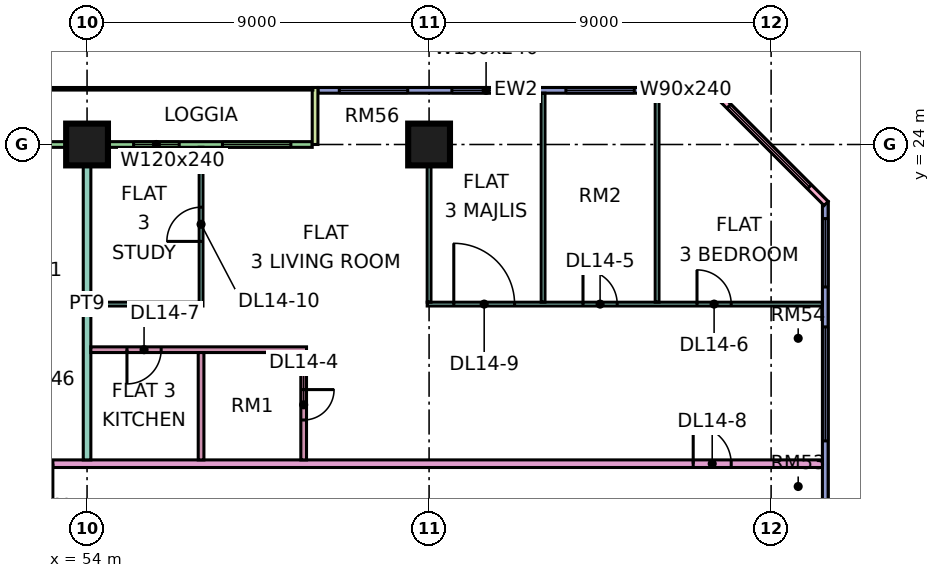
"""IFC4 building model, lengths in metres.
Left out: names, types, materials, properties, quantities, classifications, styles, units other than length and angle.
Written with IfcOpenShell. Run it as: python <this file> out.ifc"""

import sys

from ifc_helpers import new_model, si_unit, direction, frame, frame_2d, origin, origin_2d, place, context, subcontext, project, spatial, rectangle, extrude, element, fill, save


model = new_model("IFC4")
c1 = context("Model", 3, precision=1e-05, world=origin(), true_north=direction((0.0, 1.0)))
c2 = subcontext(c1, "Body", "Model", "MODEL_VIEW")
j1 = project(units=[si_unit("LENGTHUNIT", "METRE"), si_unit("PLANEANGLEUNIT", "RADIAN")], contexts=[c1])
p1 = place(None, origin())
s1 = spatial("IfcSite", under=j1, at=p1, CompositionType="ELEMENT")
p2 = place(p1, origin())
s2 = spatial("IfcBuilding", under=s1, at=p2, CompositionType="ELEMENT")
p3 = place(p2, frame((0.0, 0.0, 67.65)))
s3 = spatial("IfcBuildingStorey", under=s2, at=p3, CompositionType="ELEMENT", Elevation=67.65)
for number, where, z_axis, x_axis in (
    (1, (54.0, 24.0, 0.0), (0.0, 0.0, 1.0), (1.0, 0.0, 0.0)),
    (2, (63.0, 24.0, 0.0), (0.0, 0.0, 1.0), (1.0, 0.0, 0.0)),
):
    element("IfcColumn", number, at=place(p3, frame(where, z_axis=z_axis, x_axis=x_axis)), inside=s3, PredefinedType="COLUMN", context=c2, shape_type="SweptSolid", body=[
        extrude(rectangle(XDim=1.1, YDim=1.1, at=origin_2d()), origin(), (0.0, 0.0, 1.0), 3.75),
    ])
p4 = place(p3, frame((70.5, 25.425, 0.0), z_axis=(0.0, 0.0, 1.0), x_axis=(-1.0, 0.0, 0.0)))
e3 = element("IfcWall", 3, at=p4, inside=s3, PredefinedType="SOLIDWALL", context=c2, shape_type="SweptSolid", body=[
    extrude(rectangle(XDim=10.425, YDim=0.15, at=frame_2d((5.212, 0.0))), origin(), (0.0, 0.0, 1.0), 3.35),
])
p5 = place(p4, frame((0.3, 0.0, 0.45)))
e4 = element("IfcOpeningElement", 4, at=p5, cuts=e3, PredefinedType="OPENING", context=c2, shape_type="SweptSolid", body=[
    extrude(rectangle(XDim=0.9, YDim=2.4, at=frame_2d((0.45, 1.2))), frame((0.0, 0.085, 0.0), z_axis=(0.0, -1.0, 0.0), x_axis=(1.0, 0.0, 0.0)), (0.0, 0.0, 1.0), 0.17),
])
p6 = place(p4, frame((2.1, 0.0, 0.45)))
e5 = element("IfcOpeningElement", 5, at=p6, cuts=e3, PredefinedType="OPENING", context=c2, shape_type="SweptSolid", body=[
    extrude(rectangle(XDim=1.8, YDim=2.4, at=frame_2d((0.9, 1.2))), frame((0.0, 0.085, 0.0), z_axis=(0.0, -1.0, 0.0), x_axis=(1.0, 0.0, 0.0)), (0.0, 0.0, 1.0), 0.17),
])
p7 = place(p4, frame((5.1, 0.0, 0.45)))
e6 = element("IfcOpeningElement", 6, at=p7, cuts=e3, PredefinedType="OPENING", context=c2, shape_type="SweptSolid", body=[
    extrude(rectangle(XDim=1.8, YDim=2.4, at=frame_2d((0.9, 1.2))), frame((0.0, 0.085, 0.0), z_axis=(0.0, -1.0, 0.0), x_axis=(1.0, 0.0, 0.0)), (0.0, 0.0, 1.0), 0.17),
])
p8 = place(p4, frame((8.062, 0.0, 0.45)))
e7 = element("IfcOpeningElement", 7, at=p8, cuts=e3, PredefinedType="OPENING", context=c2, shape_type="SweptSolid", body=[
    extrude(rectangle(XDim=1.8, YDim=2.4, at=frame_2d((0.9, 1.2))), frame((0.0, 0.085, 0.0), z_axis=(0.0, -1.0, 0.0), x_axis=(1.0, 0.0, 0.0)), (0.0, 0.0, 1.0), 0.17),
])
p9 = place(p3, frame((59.925, 24.0, 0.0), z_axis=(0.0, 0.0, 1.0), x_axis=(-1.0, 0.0, 0.0)))
e8 = element("IfcWall", 8, at=p9, inside=s3, PredefinedType="SOLIDWALL", context=c2, shape_type="SweptSolid", body=[
    extrude(rectangle(XDim=11.85, YDim=0.15, at=frame_2d((5.925, 0.0))), origin(), (0.0, 0.0, 1.0), 3.35),
])
p10 = place(p9, frame((0.562, 0.0, 0.45)))
e9 = element("IfcOpeningElement", 9, at=p10, cuts=e8, PredefinedType="OPENING", context=c2, shape_type="SweptSolid", body=[
    extrude(rectangle(XDim=1.8, YDim=2.4, at=frame_2d((0.9, 1.2))), frame((0.0, 0.085, 0.0), z_axis=(0.0, -1.0, 0.0), x_axis=(1.0, 0.0, 0.0)), (0.0, 0.0, 1.0), 0.17),
])
p11 = place(p9, frame((3.5, 0.0, 0.45)))
e10 = element("IfcOpeningElement", 10, at=p11, cuts=e8, PredefinedType="OPENING", context=c2, shape_type="SweptSolid", body=[
    extrude(rectangle(XDim=1.2, YDim=2.4, at=frame_2d((0.6, 1.2))), frame((0.0, 0.085, 0.0), z_axis=(0.0, -1.0, 0.0), x_axis=(1.0, 0.0, 0.0)), (0.0, 0.0, 1.0), 0.17),
])
p12 = place(p9, frame((7.113, 0.0, 0.45)))
e11 = element("IfcOpeningElement", 11, at=p12, cuts=e8, PredefinedType="OPENING", context=c2, shape_type="SweptSolid", body=[
    extrude(rectangle(XDim=4.2, YDim=2.4, at=frame_2d((2.1, 1.2))), frame((0.0, 0.085, 0.0), z_axis=(0.0, -1.0, 0.0), x_axis=(1.0, 0.0, 0.0)), (0.0, 0.0, 1.0), 0.17),
])
p13 = place(p3, frame((60.0, 25.5, 0.0), z_axis=(0.0, 0.0, 1.0), x_axis=(0.0, -1.0, 0.0)))
e12 = element("IfcWall", 12, at=p13, inside=s3, PredefinedType="SOLIDWALL", context=c2, shape_type="SweptSolid", body=[
    extrude(rectangle(XDim=1.5, YDim=0.15, at=frame_2d((0.75, 0.0))), origin(), (0.0, 0.0, 1.0), 3.35),
])
p14 = place(p3, frame((73.425, 12.075, 0.0), z_axis=(0.0, 0.0, 1.0), x_axis=(0.0, 1.0, 0.0)))
e13 = element("IfcWall", 13, at=p14, inside=s3, PredefinedType="SOLIDWALL", context=c2, shape_type="SweptSolid", body=[
    extrude(rectangle(XDim=10.425, YDim=0.15, at=frame_2d((5.212, 0.0))), origin(), (0.0, 0.0, 1.0), 3.35),
])
p15 = place(p14, frame((4.125, 0.0, 0.45)))
e14 = element("IfcOpeningElement", 14, at=p15, cuts=e13, PredefinedType="OPENING", context=c2, shape_type="SweptSolid", body=[
    extrude(rectangle(XDim=3.0, YDim=2.4, at=frame_2d((1.5, 1.2))), frame((0.0, 0.085, 0.0), z_axis=(0.0, -1.0, 0.0), x_axis=(1.0, 0.0, 0.0)), (0.0, 0.0, 1.0), 0.17),
])
p16 = place(p14, frame((8.175, 0.0, 0.45)))
e15 = element("IfcOpeningElement", 15, at=p16, cuts=e13, PredefinedType="OPENING", context=c2, shape_type="SweptSolid", body=[
    extrude(rectangle(XDim=1.8, YDim=2.4, at=frame_2d((0.9, 1.2))), frame((0.0, 0.085, 0.0), z_axis=(0.0, -1.0, 0.0), x_axis=(1.0, 0.0, 0.0)), (0.0, 0.0, 1.0), 0.17),
])
p17 = place(p3, frame((73.447, 22.447, 0.0), z_axis=(0.0, 0.0, 1.0), x_axis=(-0.707106781187, 0.707106781187, 0.0)))
e16 = element("IfcWall", 16, at=p17, inside=s3, PredefinedType="SOLIDWALL", context=c2, shape_type="SweptSolid", body=[
    extrude(rectangle(XDim=4.243, YDim=0.15, at=frame_2d((2.121, 0.0))), origin(), (0.0, 0.0, 1.0), 3.35),
])
p18 = place(p17, frame((0.621, 0.0, 0.45)))
e17 = element("IfcOpeningElement", 17, at=p18, cuts=e16, PredefinedType="OPENING", context=c2, shape_type="SweptSolid", body=[
    extrude(rectangle(XDim=3.0, YDim=2.4, at=frame_2d((1.5, 1.2))), frame((0.0, 0.085, 0.0), z_axis=(0.0, -1.0, 0.0), x_axis=(1.0, 0.0, 0.0)), (0.0, 0.0, 1.0), 0.17),
])
p19 = place(p3, frame((51.225, 15.6, 0.0), z_axis=(0.0, 0.0, 1.0), x_axis=(1.0, 0.0, 0.0)))
e18 = element("IfcWall", 18, at=p19, inside=s3, PredefinedType="PARTITIONING", context=c2, shape_type="SweptSolid", body=[
    extrude(rectangle(XDim=22.125, YDim=0.2, at=frame_2d((11.062, 0.0))), origin(), (0.0, 0.0, 1.0), 3.35),
])
p20 = place(p19, frame((18.725, 0.0, 0.0)))
e19 = element("IfcOpeningElement", 19, at=p20, cuts=e18, PredefinedType="OPENING", context=c2, shape_type="SweptSolid", body=[
    extrude(rectangle(XDim=1.0, YDim=2.1, at=frame_2d((0.5, 1.05))), frame((0.0, 0.11, 0.0), z_axis=(0.0, -1.0, 0.0), x_axis=(1.0, 0.0, 0.0)), (0.0, 0.0, 1.0), 0.22),
])
p21 = place(p19, frame((0.875, 0.0, 0.0)))
e20 = element("IfcOpeningElement", 20, at=p21, cuts=e18, PredefinedType="OPENING", context=c2, shape_type="SweptSolid", body=[
    extrude(rectangle(XDim=1.0, YDim=2.1, at=frame_2d((0.5, 1.05))), frame((0.0, 0.11, 0.0), z_axis=(0.0, -1.0, 0.0), x_axis=(1.0, 0.0, 0.0)), (0.0, 0.0, 1.0), 0.22),
])
p22 = place(p3, frame((54.0, 15.7, 0.0), z_axis=(0.0, 0.0, 1.0), x_axis=(0.0, 1.0, 0.0)))
e21 = element("IfcWall", 21, at=p22, inside=s3, PredefinedType="PARTITIONING", context=c2, shape_type="SweptSolid", body=[
    extrude(rectangle(XDim=8.226, YDim=0.2, at=frame_2d((4.113, 0.0))), origin(), (0.0, 0.0, 1.0), 3.35),
])
p23 = place(p3, frame((54.1, 18.6, 0.0), z_axis=(0.0, 0.0, 1.0), x_axis=(1.0, 0.0, 0.0)))
e22 = element("IfcWall", 22, at=p23, inside=s3, PredefinedType="PARTITIONING", context=c2, shape_type="SweptSolid", body=[
    extrude(rectangle(XDim=5.675, YDim=0.15, at=frame_2d((2.837, 0.0))), origin(), (0.0, 0.0, 1.0), 3.35),
])
p24 = place(p23, frame((0.95, 0.0, 0.0)))
e23 = element("IfcOpeningElement", 23, at=p24, cuts=e22, PredefinedType="OPENING", context=c2, shape_type="SweptSolid", body=[
    extrude(rectangle(XDim=0.9, YDim=2.1, at=frame_2d((0.45, 1.05))), frame((0.0, 0.085, 0.0), z_axis=(0.0, -1.0, 0.0), x_axis=(1.0, 0.0, 0.0)), (0.0, 0.0, 1.0), 0.17),
])
p25 = place(p3, frame((54.1, 19.8, 0.0), z_axis=(0.0, 0.0, 1.0), x_axis=(1.0, 0.0, 0.0)))
e24 = element("IfcWall", 24, at=p25, inside=s3, PredefinedType="PARTITIONING", context=c2, shape_type="SweptSolid", body=[
    extrude(rectangle(XDim=2.85, YDim=0.1, at=frame_2d((1.425, 0.0))), origin(), (0.0, 0.0, 1.0), 3.35),
])
p26 = place(p3, frame((57.0, 15.7, 0.0), z_axis=(0.0, 0.0, 1.0), x_axis=(0.0, 1.0, 0.0)))
e25 = element("IfcWall", 25, at=p26, inside=s3, PredefinedType="PARTITIONING", context=c2, shape_type="SweptSolid", body=[
    extrude(rectangle(XDim=2.825, YDim=0.15, at=frame_2d((1.413, 0.0))), origin(), (0.0, 0.0, 1.0), 3.35),
])
p27 = place(p3, frame((57.0, 19.75, 0.0), z_axis=(0.0, 0.0, 1.0), x_axis=(0.0, 1.0, 0.0)))
e26 = element("IfcWall", 26, at=p27, inside=s3, PredefinedType="PARTITIONING", context=c2, shape_type="SweptSolid", body=[
    extrude(rectangle(XDim=4.176, YDim=0.1, at=frame_2d((2.088, 0.0))), origin(), (0.0, 0.0, 1.0), 3.35),
])
p28 = place(p27, frame((1.7, 0.0, 0.0)))
e27 = element("IfcOpeningElement", 27, at=p28, cuts=e26, PredefinedType="OPENING", context=c2, shape_type="SweptSolid", body=[
    extrude(rectangle(XDim=0.9, YDim=2.1, at=frame_2d((0.45, 1.05))), frame((0.0, 0.06, 0.0), z_axis=(0.0, -1.0, 0.0), x_axis=(1.0, 0.0, 0.0)), (0.0, 0.0, 1.0), 0.12),
])
p29 = place(p3, frame((59.7, 15.7, 0.0), z_axis=(0.0, 0.0, 1.0), x_axis=(0.0, 1.0, 0.0)))
e28 = element("IfcWall", 28, at=p29, inside=s3, PredefinedType="PARTITIONING", context=c2, shape_type="SweptSolid", body=[
    extrude(rectangle(XDim=2.825, YDim=0.15, at=frame_2d((1.413, 0.0))), origin(), (0.0, 0.0, 1.0), 3.35),
])
p30 = place(p29, frame((1.05, 0.0, 0.0)))
e29 = element("IfcOpeningElement", 29, at=p30, cuts=e28, PredefinedType="OPENING", context=c2, shape_type="SweptSolid", body=[
    extrude(rectangle(XDim=0.8, YDim=2.1, at=frame_2d((0.4, 1.05))), frame((0.0, 0.085, 0.0), z_axis=(0.0, -1.0, 0.0), x_axis=(1.0, 0.0, 0.0)), (0.0, 0.0, 1.0), 0.17),
])
p31 = place(p3, frame((62.95, 19.8, 0.0), z_axis=(0.0, 0.0, 1.0), x_axis=(1.0, 0.0, 0.0)))
e30 = element("IfcWall", 30, at=p31, inside=s3, PredefinedType="PARTITIONING", context=c2, shape_type="SweptSolid", body=[
    extrude(rectangle(XDim=10.4, YDim=0.1, at=frame_2d((5.2, 0.0))), origin(), (0.0, 0.0, 1.0), 3.35),
])
p32 = place(p31, frame((4.1, 0.0, 0.0)))
e31 = element("IfcOpeningElement", 31, at=p32, cuts=e30, PredefinedType="OPENING", context=c2, shape_type="SweptSolid", body=[
    extrude(rectangle(XDim=0.9, YDim=2.1, at=frame_2d((0.45, 1.05))), frame((0.0, 0.06, 0.0), z_axis=(0.0, -1.0, 0.0), x_axis=(1.0, 0.0, 0.0)), (0.0, 0.0, 1.0), 0.12),
])
p33 = place(p31, frame((7.1, 0.0, 0.0)))
e32 = element("IfcOpeningElement", 32, at=p33, cuts=e30, PredefinedType="OPENING", context=c2, shape_type="SweptSolid", body=[
    extrude(rectangle(XDim=0.9, YDim=2.1, at=frame_2d((0.45, 1.05))), frame((0.0, 0.06, 0.0), z_axis=(0.0, -1.0, 0.0), x_axis=(1.0, 0.0, 0.0)), (0.0, 0.0, 1.0), 0.12),
])
p34 = place(p31, frame((0.7, 0.0, 0.0)))
e33 = element("IfcOpeningElement", 33, at=p34, cuts=e30, PredefinedType="OPENING", context=c2, shape_type="SweptSolid", body=[
    extrude(rectangle(XDim=1.6, YDim=2.1, at=frame_2d((0.8, 1.05))), frame((0.0, 0.06, 0.0), z_axis=(0.0, -1.0, 0.0), x_axis=(1.0, 0.0, 0.0)), (0.0, 0.0, 1.0), 0.12),
])
p35 = place(p3, frame((63.0, 19.85, 0.0), z_axis=(0.0, 0.0, 1.0), x_axis=(0.0, 1.0, 0.0)))
e34 = element("IfcWall", 34, at=p35, inside=s3, PredefinedType="PARTITIONING", context=c2, shape_type="SweptSolid", body=[
    extrude(rectangle(XDim=4.15, YDim=0.1, at=frame_2d((2.075, 0.0))), origin(), (0.0, 0.0, 1.0), 3.35),
])
for number, where, z_axis, x_axis in (
    (35, (66.0, 19.85, 0.0), (0.0, 0.0, 1.0), (0.0, 1.0, 0.0)),
    (36, (69.0, 19.85, 0.0), (0.0, 0.0, 1.0), (0.0, 1.0, 0.0)),
):
    element("IfcWall", number, at=place(p3, frame(where, z_axis=z_axis, x_axis=x_axis)), inside=s3, PredefinedType="PARTITIONING", context=c2, shape_type="SweptSolid", body=[
        extrude(rectangle(XDim=5.501, YDim=0.1, at=frame_2d((2.75, 0.0))), origin(), (0.0, 0.0, 1.0), 3.35),
    ])
p36 = place(p5, origin())
e37 = element("IfcWindow", 37, at=p36, inside=s3, PartitioningType="SINGLE_PANEL", PredefinedType="WINDOW", context=c2, shape_type="SweptSolid", body=[
    extrude(rectangle(XDim=0.9, YDim=2.4, at=frame_2d((0.45, 1.2))), frame((0.0, 0.03, 0.0), z_axis=(0.0, -1.0, 0.0), x_axis=(1.0, 0.0, 0.0)), (0.0, 0.0, 1.0), 0.06),
])
fill(e4, e37)
p37 = place(p6, origin())
e38 = element("IfcWindow", 38, at=p37, inside=s3, PartitioningType="SINGLE_PANEL", PredefinedType="WINDOW", context=c2, shape_type="SweptSolid", body=[
    extrude(rectangle(XDim=1.8, YDim=2.4, at=frame_2d((0.9, 1.2))), frame((0.0, 0.03, 0.0), z_axis=(0.0, -1.0, 0.0), x_axis=(1.0, 0.0, 0.0)), (0.0, 0.0, 1.0), 0.06),
])
fill(e5, e38)
p38 = place(p7, origin())
e39 = element("IfcWindow", 39, at=p38, inside=s3, PartitioningType="SINGLE_PANEL", PredefinedType="WINDOW", context=c2, shape_type="SweptSolid", body=[
    extrude(rectangle(XDim=1.8, YDim=2.4, at=frame_2d((0.9, 1.2))), frame((0.0, 0.03, 0.0), z_axis=(0.0, -1.0, 0.0), x_axis=(1.0, 0.0, 0.0)), (0.0, 0.0, 1.0), 0.06),
])
fill(e6, e39)
p39 = place(p8, origin())
e40 = element("IfcWindow", 40, at=p39, inside=s3, PartitioningType="SINGLE_PANEL", PredefinedType="WINDOW", context=c2, shape_type="SweptSolid", body=[
    extrude(rectangle(XDim=1.8, YDim=2.4, at=frame_2d((0.9, 1.2))), frame((0.0, 0.03, 0.0), z_axis=(0.0, -1.0, 0.0), x_axis=(1.0, 0.0, 0.0)), (0.0, 0.0, 1.0), 0.06),
])
fill(e7, e40)
p40 = place(p10, origin())
e41 = element("IfcWindow", 41, at=p40, inside=s3, PartitioningType="SINGLE_PANEL", PredefinedType="WINDOW", context=c2, shape_type="SweptSolid", body=[
    extrude(rectangle(XDim=1.8, YDim=2.4, at=frame_2d((0.9, 1.2))), frame((0.0, 0.03, 0.0), z_axis=(0.0, -1.0, 0.0), x_axis=(1.0, 0.0, 0.0)), (0.0, 0.0, 1.0), 0.06),
])
fill(e9, e41)
p41 = place(p11, origin())
e42 = element("IfcWindow", 42, at=p41, inside=s3, PartitioningType="SINGLE_PANEL", PredefinedType="WINDOW", context=c2, shape_type="SweptSolid", body=[
    extrude(rectangle(XDim=1.2, YDim=2.4, at=frame_2d((0.6, 1.2))), frame((0.0, 0.03, 0.0), z_axis=(0.0, -1.0, 0.0), x_axis=(1.0, 0.0, 0.0)), (0.0, 0.0, 1.0), 0.06),
])
fill(e10, e42)
p42 = place(p15, origin())
e43 = element("IfcWindow", 43, at=p42, inside=s3, PartitioningType="SINGLE_PANEL", PredefinedType="WINDOW", context=c2, shape_type="SweptSolid", body=[
    extrude(rectangle(XDim=3.0, YDim=2.4, at=frame_2d((1.5, 1.2))), frame((0.0, 0.03, 0.0), z_axis=(0.0, -1.0, 0.0), x_axis=(1.0, 0.0, 0.0)), (0.0, 0.0, 1.0), 0.06),
])
fill(e14, e43)
p43 = place(p16, origin())
e44 = element("IfcWindow", 44, at=p43, inside=s3, PartitioningType="SINGLE_PANEL", PredefinedType="WINDOW", context=c2, shape_type="SweptSolid", body=[
    extrude(rectangle(XDim=1.8, YDim=2.4, at=frame_2d((0.9, 1.2))), frame((0.0, 0.03, 0.0), z_axis=(0.0, -1.0, 0.0), x_axis=(1.0, 0.0, 0.0)), (0.0, 0.0, 1.0), 0.06),
])
fill(e15, e44)
p44 = place(p18, origin())
e45 = element("IfcWindow", 45, at=p44, inside=s3, PartitioningType="SINGLE_PANEL", PredefinedType="WINDOW", context=c2, shape_type="SweptSolid", body=[
    extrude(rectangle(XDim=3.0, YDim=2.4, at=frame_2d((1.5, 1.2))), frame((0.0, 0.03, 0.0), z_axis=(0.0, -1.0, 0.0), x_axis=(1.0, 0.0, 0.0)), (0.0, 0.0, 1.0), 0.06),
])
fill(e17, e45)
p45 = place(p30, origin())
e46 = element("IfcDoor", 46, at=p45, inside=s3, OperationType="SINGLE_SWING_RIGHT", PredefinedType="DOOR", context=c2, shape_type="SweptSolid", body=[
    extrude(rectangle(XDim=0.8, YDim=2.1, at=frame_2d((0.4, 1.05))), frame((0.0, 0.025, 0.0), z_axis=(0.0, -1.0, 0.0), x_axis=(1.0, 0.0, 0.0)), (0.0, 0.0, 1.0), 0.05),
])
fill(e29, e46)
p46 = place(p32, origin())
e47 = element("IfcDoor", 47, at=p46, inside=s3, OperationType="SINGLE_SWING_LEFT", PredefinedType="DOOR", context=c2, shape_type="SweptSolid", body=[
    extrude(rectangle(XDim=0.9, YDim=2.1, at=frame_2d((0.45, 1.05))), frame((0.0, 0.025, 0.0), z_axis=(0.0, -1.0, 0.0), x_axis=(1.0, 0.0, 0.0)), (0.0, 0.0, 1.0), 0.05),
])
fill(e31, e47)
p47 = place(p33, origin())
e48 = element("IfcDoor", 48, at=p47, inside=s3, OperationType="SINGLE_SWING_LEFT", PredefinedType="DOOR", context=c2, shape_type="SweptSolid", body=[
    extrude(rectangle(XDim=0.9, YDim=2.1, at=frame_2d((0.45, 1.05))), frame((0.0, 0.025, 0.0), z_axis=(0.0, -1.0, 0.0), x_axis=(1.0, 0.0, 0.0)), (0.0, 0.0, 1.0), 0.05),
])
fill(e32, e48)
p48 = place(p24, frame((0.9, 0.0, 0.0), z_axis=(0.0, 0.0, 1.0), x_axis=(-1.0, 0.0, 0.0)))
e49 = element("IfcDoor", 49, at=p48, inside=s3, OperationType="SINGLE_SWING_LEFT", PredefinedType="DOOR", context=c2, shape_type="SweptSolid", body=[
    extrude(rectangle(XDim=0.9, YDim=2.1, at=frame_2d((0.45, 1.05))), frame((0.0, 0.025, 0.0), z_axis=(0.0, -1.0, 0.0), x_axis=(1.0, 0.0, 0.0)), (0.0, 0.0, 1.0), 0.05),
])
fill(e23, e49)
p49 = place(p20, origin())
e50 = element("IfcDoor", 50, at=p49, inside=s3, OperationType="SINGLE_SWING_LEFT", PredefinedType="DOOR", context=c2, shape_type="SweptSolid", body=[
    extrude(rectangle(XDim=1.0, YDim=2.1, at=frame_2d((0.5, 1.05))), frame((0.0, 0.025, 0.0), z_axis=(0.0, -1.0, 0.0), x_axis=(1.0, 0.0, 0.0)), (0.0, 0.0, 1.0), 0.05),
])
fill(e19, e50)
p50 = place(p34, origin())
e51 = element("IfcDoor", 51, at=p50, inside=s3, OperationType="DOUBLE_DOOR_SINGLE_SWING", PredefinedType="DOOR", context=c2, shape_type="SweptSolid", body=[
    extrude(rectangle(XDim=1.6, YDim=2.1, at=frame_2d((0.8, 1.05))), frame((0.0, 0.025, 0.0), z_axis=(0.0, -1.0, 0.0), x_axis=(1.0, 0.0, 0.0)), (0.0, 0.0, 1.0), 0.05),
])
fill(e33, e51)
p51 = place(p28, origin())
e52 = element("IfcDoor", 52, at=p51, inside=s3, OperationType="SINGLE_SWING_LEFT", PredefinedType="DOOR", context=c2, shape_type="SweptSolid", body=[
    extrude(rectangle(XDim=0.9, YDim=2.1, at=frame_2d((0.45, 1.05))), frame((0.0, 0.025, 0.0), z_axis=(0.0, -1.0, 0.0), x_axis=(1.0, 0.0, 0.0)), (0.0, 0.0, 1.0), 0.05),
])
fill(e27, e52)
p52 = place(p21, origin())
e53 = element("IfcDoor", 53, at=p52, inside=s3, OperationType="SINGLE_SWING_RIGHT", PredefinedType="DOOR", context=c2, shape_type="SweptSolid", body=[
    extrude(rectangle(XDim=1.0, YDim=2.1, at=frame_2d((0.5, 1.05))), frame((0.0, 0.025, 0.0), z_axis=(0.0, -1.0, 0.0), x_axis=(1.0, 0.0, 0.0)), (0.0, 0.0, 1.0), 0.05),
])
fill(e20, e53)
save(model, sys.argv[1])
